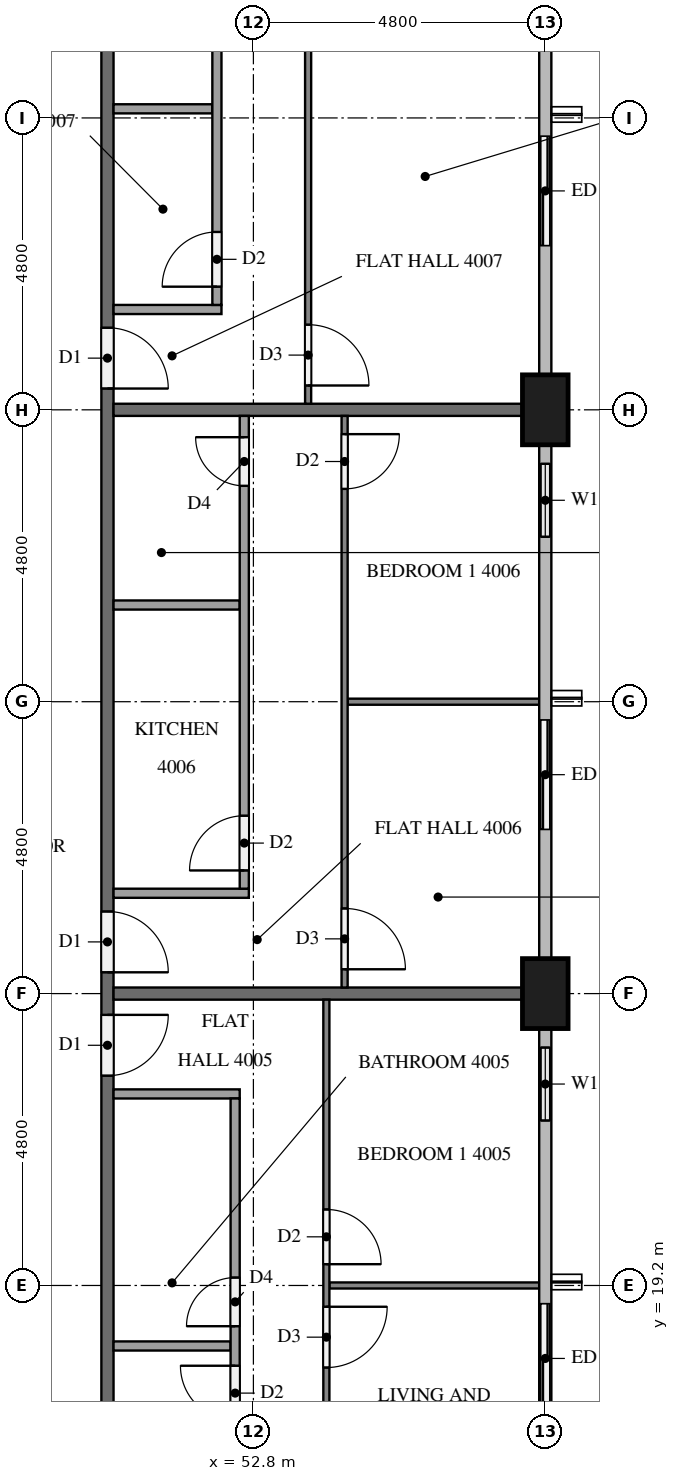
"""IFC4 building model, lengths in metres.
Left out: names, types, materials, properties, quantities, classifications, styles, units other than length and angle.
Written with IfcOpenShell. Run it as: python <this file> out.ifc"""

import sys

from ifc_helpers import new_model, si_unit, direction, frame, frame_2d, origin, origin_2d, place, context, subcontext, project, spatial, rectangle, extrude, element, fill, save


model = new_model("IFC4")
c1 = context("Model", 3, precision=1e-05, world=origin(), true_north=direction((0.0, 1.0)))
c2 = subcontext(c1, "Body", "Model", "MODEL_VIEW")
j1 = project(units=[si_unit("LENGTHUNIT", "METRE"), si_unit("PLANEANGLEUNIT", "RADIAN")], contexts=[c1])
p1 = place(None, origin())
s1 = spatial("IfcSite", under=j1, at=p1, CompositionType="ELEMENT")
p2 = place(p1, origin())
s2 = spatial("IfcBuilding", under=s1, at=p2, CompositionType="ELEMENT")
p3 = place(p2, frame((0.0, 0.0, 156.0)))
s3 = spatial("IfcBuildingStorey", under=s2, at=p3, CompositionType="ELEMENT", Elevation=156.0)
for number, where, z_axis, x_axis in (
    (1, (57.6, 24.0, 0.0), (0.0, 0.0, 1.0), (0.0, 1.0, 0.0)),
    (2, (57.6, 33.6, 0.0), (0.0, 0.0, 1.0), (0.0, 1.0, 0.0)),
):
    element("IfcColumn", number, at=place(p3, frame(where, z_axis=z_axis, x_axis=x_axis)), inside=s3, PredefinedType="COLUMN", context=c2, shape_type="SweptSolid", body=[
        extrude(rectangle(XDim=1.15, YDim=0.75, at=origin_2d()), origin(), (0.0, 0.0, 1.0), 3.2),
    ])
p4 = place(p3, frame((57.6, 16.8, 0.0), z_axis=(0.0, 0.0, 1.0), x_axis=(0.0, 1.0, 0.0)))
e3 = element("IfcWall", 3, at=p4, inside=s3, PredefinedType="SOLIDWALL", context=c2, shape_type="SweptSolid", body=[
    extrude(rectangle(XDim=2.4, YDim=0.15, at=frame_2d((1.2, 0.0))), origin(), (0.0, 0.0, 1.0), 3.2),
])
p5 = place(p4, frame((0.3, 0.0, 0.0)))
e4 = element("IfcOpeningElement", 4, at=p5, cuts=e3, PredefinedType="OPENING", context=c2, shape_type="SweptSolid", body=[
    extrude(rectangle(XDim=1.8, YDim=2.4, at=frame_2d((0.9, 1.2))), frame((0.0, 0.085, 0.0), z_axis=(0.0, -1.0, 0.0), x_axis=(1.0, 0.0, 0.0)), (0.0, 0.0, 1.0), 0.17),
])
p6 = place(p3, frame((57.6, 21.6, 0.0), z_axis=(0.0, 0.0, 1.0), x_axis=(0.0, 1.0, 0.0)))
e5 = element("IfcWall", 5, at=p6, inside=s3, PredefinedType="SOLIDWALL", context=c2, shape_type="SweptSolid", body=[
    extrude(rectangle(XDim=1.825, YDim=0.15, at=frame_2d((0.913, 0.0))), origin(), (0.0, 0.0, 1.0), 3.2),
])
p7 = place(p6, frame((0.312, 0.0, 0.9)))
e6 = element("IfcOpeningElement", 6, at=p7, cuts=e5, PredefinedType="OPENING", context=c2, shape_type="SweptSolid", body=[
    extrude(rectangle(XDim=1.2, YDim=1.4, at=frame_2d((0.6, 0.7))), frame((0.0, 0.085, 0.0), z_axis=(0.0, -1.0, 0.0), x_axis=(1.0, 0.0, 0.0)), (0.0, 0.0, 1.0), 0.17),
])
p8 = place(p3, frame((57.6, 26.4, 0.0), z_axis=(0.0, 0.0, 1.0), x_axis=(0.0, 1.0, 0.0)))
e7 = element("IfcWall", 7, at=p8, inside=s3, PredefinedType="SOLIDWALL", context=c2, shape_type="SweptSolid", body=[
    extrude(rectangle(XDim=2.4, YDim=0.15, at=frame_2d((1.2, 0.0))), origin(), (0.0, 0.0, 1.0), 3.2),
])
p9 = place(p8, frame((0.3, 0.0, 0.0)))
e8 = element("IfcOpeningElement", 8, at=p9, cuts=e7, PredefinedType="OPENING", context=c2, shape_type="SweptSolid", body=[
    extrude(rectangle(XDim=1.8, YDim=2.4, at=frame_2d((0.9, 1.2))), frame((0.0, 0.085, 0.0), z_axis=(0.0, -1.0, 0.0), x_axis=(1.0, 0.0, 0.0)), (0.0, 0.0, 1.0), 0.17),
])
p10 = place(p3, frame((57.6, 31.2, 0.0), z_axis=(0.0, 0.0, 1.0), x_axis=(0.0, 1.0, 0.0)))
e9 = element("IfcWall", 9, at=p10, inside=s3, PredefinedType="SOLIDWALL", context=c2, shape_type="SweptSolid", body=[
    extrude(rectangle(XDim=1.825, YDim=0.15, at=frame_2d((0.913, 0.0))), origin(), (0.0, 0.0, 1.0), 3.2),
])
p11 = place(p10, frame((0.312, 0.0, 0.9)))
e10 = element("IfcOpeningElement", 10, at=p11, cuts=e9, PredefinedType="OPENING", context=c2, shape_type="SweptSolid", body=[
    extrude(rectangle(XDim=1.2, YDim=1.4, at=frame_2d((0.6, 0.7))), frame((0.0, 0.085, 0.0), z_axis=(0.0, -1.0, 0.0), x_axis=(1.0, 0.0, 0.0)), (0.0, 0.0, 1.0), 0.17),
])
p12 = place(p3, frame((57.6, 36.0, 0.0), z_axis=(0.0, 0.0, 1.0), x_axis=(0.0, 1.0, 0.0)))
e11 = element("IfcWall", 11, at=p12, inside=s3, PredefinedType="SOLIDWALL", context=c2, shape_type="SweptSolid", body=[
    extrude(rectangle(XDim=2.4, YDim=0.15, at=frame_2d((1.2, 0.0))), origin(), (0.0, 0.0, 1.0), 3.2),
])
p13 = place(p12, frame((0.3, 0.0, 0.0)))
e12 = element("IfcOpeningElement", 12, at=p13, cuts=e11, PredefinedType="OPENING", context=c2, shape_type="SweptSolid", body=[
    extrude(rectangle(XDim=1.8, YDim=2.4, at=frame_2d((0.9, 1.2))), frame((0.0, 0.085, 0.0), z_axis=(0.0, -1.0, 0.0), x_axis=(1.0, 0.0, 0.0)), (0.0, 0.0, 1.0), 0.17),
])
p14 = place(p3, frame((50.4, 40.7, 0.0), z_axis=(0.0, 0.0, 1.0), x_axis=(0.0, -1.0, 0.0)))
e13 = element("IfcWall", 13, at=p14, inside=s3, PredefinedType="PARTITIONING", context=c2, shape_type="SweptSolid", body=[
    extrude(rectangle(XDim=28.6, YDim=0.2, at=frame_2d((14.3, 0.0))), origin(), (0.0, 0.0, 1.0), 3.2),
])
p15 = place(p14, frame((17.05, 0.0, 0.0)))
e14 = element("IfcOpeningElement", 14, at=p15, cuts=e13, PredefinedType="OPENING", context=c2, shape_type="SweptSolid", body=[
    extrude(rectangle(XDim=1.0, YDim=2.1, at=frame_2d((0.5, 1.05))), frame((0.0, 0.11, 0.0), z_axis=(0.0, -1.0, 0.0), x_axis=(1.0, 0.0, 0.0)), (0.0, 0.0, 1.0), 0.22),
])
p16 = place(p14, frame((15.35, 0.0, 0.0)))
e15 = element("IfcOpeningElement", 15, at=p16, cuts=e13, PredefinedType="OPENING", context=c2, shape_type="SweptSolid", body=[
    extrude(rectangle(XDim=1.0, YDim=2.1, at=frame_2d((0.5, 1.05))), frame((0.0, 0.11, 0.0), z_axis=(0.0, -1.0, 0.0), x_axis=(1.0, 0.0, 0.0)), (0.0, 0.0, 1.0), 0.22),
])
p17 = place(p14, frame((5.75, 0.0, 0.0)))
e16 = element("IfcOpeningElement", 16, at=p17, cuts=e13, PredefinedType="OPENING", context=c2, shape_type="SweptSolid", body=[
    extrude(rectangle(XDim=1.0, YDim=2.1, at=frame_2d((0.5, 1.05))), frame((0.0, 0.11, 0.0), z_axis=(0.0, -1.0, 0.0), x_axis=(1.0, 0.0, 0.0)), (0.0, 0.0, 1.0), 0.22),
])
for number, where, z_axis, x_axis in (
    (17, (50.5, 24.0, 0.0), (0.0, 0.0, 1.0), (1.0, 0.0, 0.0)),
    (18, (50.5, 33.6, 0.0), (0.0, 0.0, 1.0), (1.0, 0.0, 0.0)),
):
    element("IfcWall", number, at=place(p3, frame(where, z_axis=z_axis, x_axis=x_axis)), inside=s3, PredefinedType="PARTITIONING", context=c2, shape_type="SweptSolid", body=[
        extrude(rectangle(XDim=6.725, YDim=0.2, at=frame_2d((3.363, 0.0))), origin(), (0.0, 0.0, 1.0), 3.2),
    ])
p18 = place(p3, frame((54.05, 19.2, 0.0), z_axis=(0.0, 0.0, 1.0), x_axis=(1.0, 0.0, 0.0)))
e19 = element("IfcWall", 19, at=p18, inside=s3, PredefinedType="PARTITIONING", context=c2, shape_type="SweptSolid", body=[
    extrude(rectangle(XDim=3.45, YDim=0.1, at=frame_2d((1.725, 0.0))), origin(), (0.0, 0.0, 1.0), 3.2),
])
p19 = place(p3, frame((54.0, 23.9, 0.0), z_axis=(0.0, 0.0, 1.0), x_axis=(0.0, -1.0, 0.0)))
e20 = element("IfcWall", 20, at=p19, inside=s3, PredefinedType="PARTITIONING", context=c2, shape_type="SweptSolid", body=[
    extrude(rectangle(XDim=11.8, YDim=0.1, at=frame_2d((5.9, 0.0))), origin(), (0.0, 0.0, 1.0), 3.2),
])
p20 = place(p19, frame((3.45, 0.0, 0.0)))
e21 = element("IfcOpeningElement", 21, at=p20, cuts=e20, PredefinedType="OPENING", context=c2, shape_type="SweptSolid", body=[
    extrude(rectangle(XDim=0.9, YDim=2.1, at=frame_2d((0.45, 1.05))), frame((0.0, 0.06, 0.0), z_axis=(0.0, -1.0, 0.0), x_axis=(1.0, 0.0, 0.0)), (0.0, 0.0, 1.0), 0.12),
])
p21 = place(p19, frame((5.05, 0.0, 0.0)))
e22 = element("IfcOpeningElement", 22, at=p21, cuts=e20, PredefinedType="OPENING", context=c2, shape_type="SweptSolid", body=[
    extrude(rectangle(XDim=1.0, YDim=2.1, at=frame_2d((0.5, 1.05))), frame((0.0, 0.06, 0.0), z_axis=(0.0, -1.0, 0.0), x_axis=(1.0, 0.0, 0.0)), (0.0, 0.0, 1.0), 0.12),
])
p22 = place(p3, frame((50.5, 18.205, 0.0), z_axis=(0.0, 0.0, 1.0), x_axis=(1.0, 0.0, 0.0)))
e23 = element("IfcWall", 23, at=p22, inside=s3, PredefinedType="PARTITIONING", context=c2, shape_type="SweptSolid", body=[
    extrude(rectangle(XDim=1.925, YDim=0.15, at=frame_2d((0.962, 0.0))), origin(), (0.0, 0.0, 1.0), 3.2),
])
p23 = place(p3, frame((50.5, 22.35, 0.0), z_axis=(0.0, 0.0, 1.0), x_axis=(1.0, 0.0, 0.0)))
e24 = element("IfcWall", 24, at=p23, inside=s3, PredefinedType="PARTITIONING", context=c2, shape_type="SweptSolid", body=[
    extrude(rectangle(XDim=2.075, YDim=0.15, at=frame_2d((1.038, 0.0))), origin(), (0.0, 0.0, 1.0), 3.2),
])
p24 = place(p3, frame((52.5, 12.1, 0.0), z_axis=(0.0, 0.0, 1.0), x_axis=(0.0, 1.0, 0.0)))
e25 = element("IfcWall", 25, at=p24, inside=s3, PredefinedType="PARTITIONING", context=c2, shape_type="SweptSolid", body=[
    extrude(rectangle(XDim=10.175, YDim=0.15, at=frame_2d((5.087, 0.0))), origin(), (0.0, 0.0, 1.0), 3.2),
])
p25 = place(p24, frame((6.43, 0.0, 0.0)))
e26 = element("IfcOpeningElement", 26, at=p25, cuts=e25, PredefinedType="OPENING", context=c2, shape_type="SweptSolid", body=[
    extrude(rectangle(XDim=0.8, YDim=2.1, at=frame_2d((0.4, 1.05))), frame((0.0, 0.085, 0.0), z_axis=(0.0, -1.0, 0.0), x_axis=(1.0, 0.0, 0.0)), (0.0, 0.0, 1.0), 0.17),
])
p26 = place(p24, frame((4.88, 0.0, 0.0)))
e27 = element("IfcOpeningElement", 27, at=p26, cuts=e25, PredefinedType="OPENING", context=c2, shape_type="SweptSolid", body=[
    extrude(rectangle(XDim=0.9, YDim=2.1, at=frame_2d((0.45, 1.05))), frame((0.0, 0.085, 0.0), z_axis=(0.0, -1.0, 0.0), x_axis=(1.0, 0.0, 0.0)), (0.0, 0.0, 1.0), 0.17),
])
p27 = place(p3, frame((54.35, 28.8, 0.0), z_axis=(0.0, 0.0, 1.0), x_axis=(1.0, 0.0, 0.0)))
e28 = element("IfcWall", 28, at=p27, inside=s3, PredefinedType="PARTITIONING", context=c2, shape_type="SweptSolid", body=[
    extrude(rectangle(XDim=3.15, YDim=0.1, at=frame_2d((1.575, 0.0))), origin(), (0.0, 0.0, 1.0), 3.2),
])
p28 = place(p3, frame((54.3, 33.5, 0.0), z_axis=(0.0, 0.0, 1.0), x_axis=(0.0, -1.0, 0.0)))
e29 = element("IfcWall", 29, at=p28, inside=s3, PredefinedType="PARTITIONING", context=c2, shape_type="SweptSolid", body=[
    extrude(rectangle(XDim=9.4, YDim=0.1, at=frame_2d((4.7, 0.0))), origin(), (0.0, 0.0, 1.0), 3.2),
])
p29 = place(p28, frame((8.1, 0.0, 0.0)))
e30 = element("IfcOpeningElement", 30, at=p29, cuts=e29, PredefinedType="OPENING", context=c2, shape_type="SweptSolid", body=[
    extrude(rectangle(XDim=1.0, YDim=2.1, at=frame_2d((0.5, 1.05))), frame((0.0, 0.06, 0.0), z_axis=(0.0, -1.0, 0.0), x_axis=(1.0, 0.0, 0.0)), (0.0, 0.0, 1.0), 0.12),
])
p30 = place(p28, frame((0.3, 0.0, 0.0)))
e31 = element("IfcOpeningElement", 31, at=p30, cuts=e29, PredefinedType="OPENING", context=c2, shape_type="SweptSolid", body=[
    extrude(rectangle(XDim=0.9, YDim=2.1, at=frame_2d((0.45, 1.05))), frame((0.0, 0.06, 0.0), z_axis=(0.0, -1.0, 0.0), x_axis=(1.0, 0.0, 0.0)), (0.0, 0.0, 1.0), 0.12),
])
p31 = place(p3, frame((50.5, 30.39, 0.0), z_axis=(0.0, 0.0, 1.0), x_axis=(1.0, 0.0, 0.0)))
e32 = element("IfcWall", 32, at=p31, inside=s3, PredefinedType="PARTITIONING", context=c2, shape_type="SweptSolid", body=[
    extrude(rectangle(XDim=2.075, YDim=0.15, at=frame_2d((1.038, 0.0))), origin(), (0.0, 0.0, 1.0), 3.2),
])
p32 = place(p3, frame((50.5, 25.65, 0.0), z_axis=(0.0, 0.0, 1.0), x_axis=(1.0, 0.0, 0.0)))
e33 = element("IfcWall", 33, at=p32, inside=s3, PredefinedType="PARTITIONING", context=c2, shape_type="SweptSolid", body=[
    extrude(rectangle(XDim=2.225, YDim=0.15, at=frame_2d((1.113, 0.0))), origin(), (0.0, 0.0, 1.0), 3.2),
])
p33 = place(p3, frame((52.65, 25.725, 0.0), z_axis=(0.0, 0.0, 1.0), x_axis=(0.0, 1.0, 0.0)))
e34 = element("IfcWall", 34, at=p33, inside=s3, PredefinedType="PARTITIONING", context=c2, shape_type="SweptSolid", body=[
    extrude(rectangle(XDim=7.775, YDim=0.15, at=frame_2d((3.887, 0.0))), origin(), (0.0, 0.0, 1.0), 3.2),
])
p34 = place(p33, frame((0.3, 0.0, 0.0)))
e35 = element("IfcOpeningElement", 35, at=p34, cuts=e34, PredefinedType="OPENING", context=c2, shape_type="SweptSolid", body=[
    extrude(rectangle(XDim=0.9, YDim=2.1, at=frame_2d((0.45, 1.05))), frame((0.0, 0.085, 0.0), z_axis=(0.0, -1.0, 0.0), x_axis=(1.0, 0.0, 0.0)), (0.0, 0.0, 1.0), 0.17),
])
p35 = place(p33, frame((6.625, 0.0, 0.0)))
e36 = element("IfcOpeningElement", 36, at=p35, cuts=e34, PredefinedType="OPENING", context=c2, shape_type="SweptSolid", body=[
    extrude(rectangle(XDim=0.8, YDim=2.1, at=frame_2d((0.4, 1.05))), frame((0.0, 0.085, 0.0), z_axis=(0.0, -1.0, 0.0), x_axis=(1.0, 0.0, 0.0)), (0.0, 0.0, 1.0), 0.17),
])
p36 = place(p3, frame((53.7, 40.7, 0.0), z_axis=(0.0, 0.0, 1.0), x_axis=(0.0, -1.0, 0.0)))
e37 = element("IfcWall", 37, at=p36, inside=s3, PredefinedType="PARTITIONING", context=c2, shape_type="SweptSolid", body=[
    extrude(rectangle(XDim=7.0, YDim=0.1, at=frame_2d((3.5, 0.0))), origin(), (0.0, 0.0, 1.0), 3.2),
])
p37 = place(p36, frame((5.7, 0.0, 0.0)))
e38 = element("IfcOpeningElement", 38, at=p37, cuts=e37, PredefinedType="OPENING", context=c2, shape_type="SweptSolid", body=[
    extrude(rectangle(XDim=1.0, YDim=2.1, at=frame_2d((0.5, 1.05))), frame((0.0, 0.06, 0.0), z_axis=(0.0, -1.0, 0.0), x_axis=(1.0, 0.0, 0.0)), (0.0, 0.0, 1.0), 0.12),
])
p38 = place(p3, frame((50.5, 38.55, 0.0), z_axis=(0.0, 0.0, 1.0), x_axis=(1.0, 0.0, 0.0)))
e39 = element("IfcWall", 39, at=p38, inside=s3, PredefinedType="PARTITIONING", context=c2, shape_type="SweptSolid", body=[
    extrude(rectangle(XDim=1.625, YDim=0.15, at=frame_2d((0.812, 0.0))), origin(), (0.0, 0.0, 1.0), 3.2),
])
p39 = place(p3, frame((50.5, 35.25, 0.0), z_axis=(0.0, 0.0, 1.0), x_axis=(1.0, 0.0, 0.0)))
e40 = element("IfcWall", 40, at=p39, inside=s3, PredefinedType="PARTITIONING", context=c2, shape_type="SweptSolid", body=[
    extrude(rectangle(XDim=1.775, YDim=0.15, at=frame_2d((0.887, 0.0))), origin(), (0.0, 0.0, 1.0), 3.2),
])
p40 = place(p3, frame((52.2, 35.325, 0.0), z_axis=(0.0, 0.0, 1.0), x_axis=(0.0, 1.0, 0.0)))
e41 = element("IfcWall", 41, at=p40, inside=s3, PredefinedType="PARTITIONING", context=c2, shape_type="SweptSolid", body=[
    extrude(rectangle(XDim=5.375, YDim=0.15, at=frame_2d((2.688, 0.0))), origin(), (0.0, 0.0, 1.0), 3.2),
])
p41 = place(p40, frame((0.3, 0.0, 0.0)))
e42 = element("IfcOpeningElement", 42, at=p41, cuts=e41, PredefinedType="OPENING", context=c2, shape_type="SweptSolid", body=[
    extrude(rectangle(XDim=0.9, YDim=2.1, at=frame_2d((0.45, 1.05))), frame((0.0, 0.085, 0.0), z_axis=(0.0, -1.0, 0.0), x_axis=(1.0, 0.0, 0.0)), (0.0, 0.0, 1.0), 0.17),
])
p42 = place(p40, frame((4.225, 0.0, 0.0)))
e43 = element("IfcOpeningElement", 43, at=p42, cuts=e41, PredefinedType="OPENING", context=c2, shape_type="SweptSolid", body=[
    extrude(rectangle(XDim=0.8, YDim=2.1, at=frame_2d((0.4, 1.05))), frame((0.0, 0.085, 0.0), z_axis=(0.0, -1.0, 0.0), x_axis=(1.0, 0.0, 0.0)), (0.0, 0.0, 1.0), 0.17),
])
p43 = place(p5, origin())
e44 = element("IfcDoor", 44, at=p43, inside=s3, OperationType="SLIDING_TO_LEFT", PredefinedType="DOOR", context=c2, shape_type="SweptSolid", body=[
    extrude(rectangle(XDim=1.8, YDim=2.4, at=frame_2d((0.9, 1.2))), frame((0.0, 0.025, 0.0), z_axis=(0.0, -1.0, 0.0), x_axis=(1.0, 0.0, 0.0)), (0.0, 0.0, 1.0), 0.05),
])
fill(e4, e44)
p44 = place(p7, origin())
e45 = element("IfcWindow", 45, at=p44, inside=s3, PartitioningType="SINGLE_PANEL", PredefinedType="WINDOW", context=c2, shape_type="SweptSolid", body=[
    extrude(rectangle(XDim=1.2, YDim=1.4, at=frame_2d((0.6, 0.7))), frame((0.0, 0.03, 0.0), z_axis=(0.0, -1.0, 0.0), x_axis=(1.0, 0.0, 0.0)), (0.0, 0.0, 1.0), 0.06),
])
fill(e6, e45)
p45 = place(p9, origin())
e46 = element("IfcDoor", 46, at=p45, inside=s3, OperationType="SLIDING_TO_RIGHT", PredefinedType="DOOR", context=c2, shape_type="SweptSolid", body=[
    extrude(rectangle(XDim=1.8, YDim=2.4, at=frame_2d((0.9, 1.2))), frame((0.0, 0.025, 0.0), z_axis=(0.0, -1.0, 0.0), x_axis=(1.0, 0.0, 0.0)), (0.0, 0.0, 1.0), 0.05),
])
fill(e8, e46)
p46 = place(p11, origin())
e47 = element("IfcWindow", 47, at=p46, inside=s3, PartitioningType="SINGLE_PANEL", PredefinedType="WINDOW", context=c2, shape_type="SweptSolid", body=[
    extrude(rectangle(XDim=1.2, YDim=1.4, at=frame_2d((0.6, 0.7))), frame((0.0, 0.03, 0.0), z_axis=(0.0, -1.0, 0.0), x_axis=(1.0, 0.0, 0.0)), (0.0, 0.0, 1.0), 0.06),
])
fill(e10, e47)
p47 = place(p13, origin())
e48 = element("IfcDoor", 48, at=p47, inside=s3, OperationType="SLIDING_TO_LEFT", PredefinedType="DOOR", context=c2, shape_type="SweptSolid", body=[
    extrude(rectangle(XDim=1.8, YDim=2.4, at=frame_2d((0.9, 1.2))), frame((0.0, 0.025, 0.0), z_axis=(0.0, -1.0, 0.0), x_axis=(1.0, 0.0, 0.0)), (0.0, 0.0, 1.0), 0.05),
])
fill(e12, e48)
p48 = place(p15, origin())
e49 = element("IfcDoor", 49, at=p48, inside=s3, OperationType="SINGLE_SWING_LEFT", PredefinedType="DOOR", context=c2, shape_type="SweptSolid", body=[
    extrude(rectangle(XDim=1.0, YDim=2.1, at=frame_2d((0.5, 1.05))), frame((0.0, 0.025, 0.0), z_axis=(0.0, -1.0, 0.0), x_axis=(1.0, 0.0, 0.0)), (0.0, 0.0, 1.0), 0.05),
])
fill(e14, e49)
p49 = place(p16, origin())
e50 = element("IfcDoor", 50, at=p49, inside=s3, OperationType="SINGLE_SWING_RIGHT", PredefinedType="DOOR", context=c2, shape_type="SweptSolid", body=[
    extrude(rectangle(XDim=1.0, YDim=2.1, at=frame_2d((0.5, 1.05))), frame((0.0, 0.025, 0.0), z_axis=(0.0, -1.0, 0.0), x_axis=(1.0, 0.0, 0.0)), (0.0, 0.0, 1.0), 0.05),
])
fill(e15, e50)
p50 = place(p17, origin())
e51 = element("IfcDoor", 51, at=p50, inside=s3, OperationType="SINGLE_SWING_RIGHT", PredefinedType="DOOR", context=c2, shape_type="SweptSolid", body=[
    extrude(rectangle(XDim=1.0, YDim=2.1, at=frame_2d((0.5, 1.05))), frame((0.0, 0.025, 0.0), z_axis=(0.0, -1.0, 0.0), x_axis=(1.0, 0.0, 0.0)), (0.0, 0.0, 1.0), 0.05),
])
fill(e16, e51)
p51 = place(p20, origin())
e52 = element("IfcDoor", 52, at=p51, inside=s3, OperationType="SINGLE_SWING_RIGHT", PredefinedType="DOOR", context=c2, shape_type="SweptSolid", body=[
    extrude(rectangle(XDim=0.9, YDim=2.1, at=frame_2d((0.45, 1.05))), frame((0.0, 0.025, 0.0), z_axis=(0.0, -1.0, 0.0), x_axis=(1.0, 0.0, 0.0)), (0.0, 0.0, 1.0), 0.05),
])
fill(e21, e52)
p52 = place(p21, origin())
e53 = element("IfcDoor", 53, at=p52, inside=s3, OperationType="SINGLE_SWING_LEFT", PredefinedType="DOOR", context=c2, shape_type="SweptSolid", body=[
    extrude(rectangle(XDim=1.0, YDim=2.1, at=frame_2d((0.5, 1.05))), frame((0.0, 0.025, 0.0), z_axis=(0.0, -1.0, 0.0), x_axis=(1.0, 0.0, 0.0)), (0.0, 0.0, 1.0), 0.05),
])
fill(e22, e53)
p53 = place(p25, origin())
e54 = element("IfcDoor", 54, at=p53, inside=s3, OperationType="SINGLE_SWING_LEFT", PredefinedType="DOOR", context=c2, shape_type="SweptSolid", body=[
    extrude(rectangle(XDim=0.8, YDim=2.1, at=frame_2d((0.4, 1.05))), frame((0.0, 0.025, 0.0), z_axis=(0.0, -1.0, 0.0), x_axis=(1.0, 0.0, 0.0)), (0.0, 0.0, 1.0), 0.05),
])
fill(e26, e54)
p54 = place(p26, origin())
e55 = element("IfcDoor", 55, at=p54, inside=s3, OperationType="SINGLE_SWING_RIGHT", PredefinedType="DOOR", context=c2, shape_type="SweptSolid", body=[
    extrude(rectangle(XDim=0.9, YDim=2.1, at=frame_2d((0.45, 1.05))), frame((0.0, 0.025, 0.0), z_axis=(0.0, -1.0, 0.0), x_axis=(1.0, 0.0, 0.0)), (0.0, 0.0, 1.0), 0.05),
])
fill(e27, e55)
p55 = place(p29, origin())
e56 = element("IfcDoor", 56, at=p55, inside=s3, OperationType="SINGLE_SWING_RIGHT", PredefinedType="DOOR", context=c2, shape_type="SweptSolid", body=[
    extrude(rectangle(XDim=1.0, YDim=2.1, at=frame_2d((0.5, 1.05))), frame((0.0, 0.025, 0.0), z_axis=(0.0, -1.0, 0.0), x_axis=(1.0, 0.0, 0.0)), (0.0, 0.0, 1.0), 0.05),
])
fill(e30, e56)
p56 = place(p30, origin())
e57 = element("IfcDoor", 57, at=p56, inside=s3, OperationType="SINGLE_SWING_LEFT", PredefinedType="DOOR", context=c2, shape_type="SweptSolid", body=[
    extrude(rectangle(XDim=0.9, YDim=2.1, at=frame_2d((0.45, 1.05))), frame((0.0, 0.025, 0.0), z_axis=(0.0, -1.0, 0.0), x_axis=(1.0, 0.0, 0.0)), (0.0, 0.0, 1.0), 0.05),
])
fill(e31, e57)
p57 = place(p34, origin())
e58 = element("IfcDoor", 58, at=p57, inside=s3, OperationType="SINGLE_SWING_LEFT", PredefinedType="DOOR", context=c2, shape_type="SweptSolid", body=[
    extrude(rectangle(XDim=0.9, YDim=2.1, at=frame_2d((0.45, 1.05))), frame((0.0, 0.025, 0.0), z_axis=(0.0, -1.0, 0.0), x_axis=(1.0, 0.0, 0.0)), (0.0, 0.0, 1.0), 0.05),
])
fill(e35, e58)
p58 = place(p35, origin())
e59 = element("IfcDoor", 59, at=p58, inside=s3, OperationType="SINGLE_SWING_RIGHT", PredefinedType="DOOR", context=c2, shape_type="SweptSolid", body=[
    extrude(rectangle(XDim=0.8, YDim=2.1, at=frame_2d((0.4, 1.05))), frame((0.0, 0.025, 0.0), z_axis=(0.0, -1.0, 0.0), x_axis=(1.0, 0.0, 0.0)), (0.0, 0.0, 1.0), 0.05),
])
fill(e36, e59)
p59 = place(p37, origin())
e60 = element("IfcDoor", 60, at=p59, inside=s3, OperationType="SINGLE_SWING_RIGHT", PredefinedType="DOOR", context=c2, shape_type="SweptSolid", body=[
    extrude(rectangle(XDim=1.0, YDim=2.1, at=frame_2d((0.5, 1.05))), frame((0.0, 0.025, 0.0), z_axis=(0.0, -1.0, 0.0), x_axis=(1.0, 0.0, 0.0)), (0.0, 0.0, 1.0), 0.05),
])
fill(e38, e60)
p60 = place(p41, origin())
e61 = element("IfcDoor", 61, at=p60, inside=s3, OperationType="SINGLE_SWING_LEFT", PredefinedType="DOOR", context=c2, shape_type="SweptSolid", body=[
    extrude(rectangle(XDim=0.9, YDim=2.1, at=frame_2d((0.45, 1.05))), frame((0.0, 0.025, 0.0), z_axis=(0.0, -1.0, 0.0), x_axis=(1.0, 0.0, 0.0)), (0.0, 0.0, 1.0), 0.05),
])
fill(e42, e61)
save(model, sys.argv[1])
